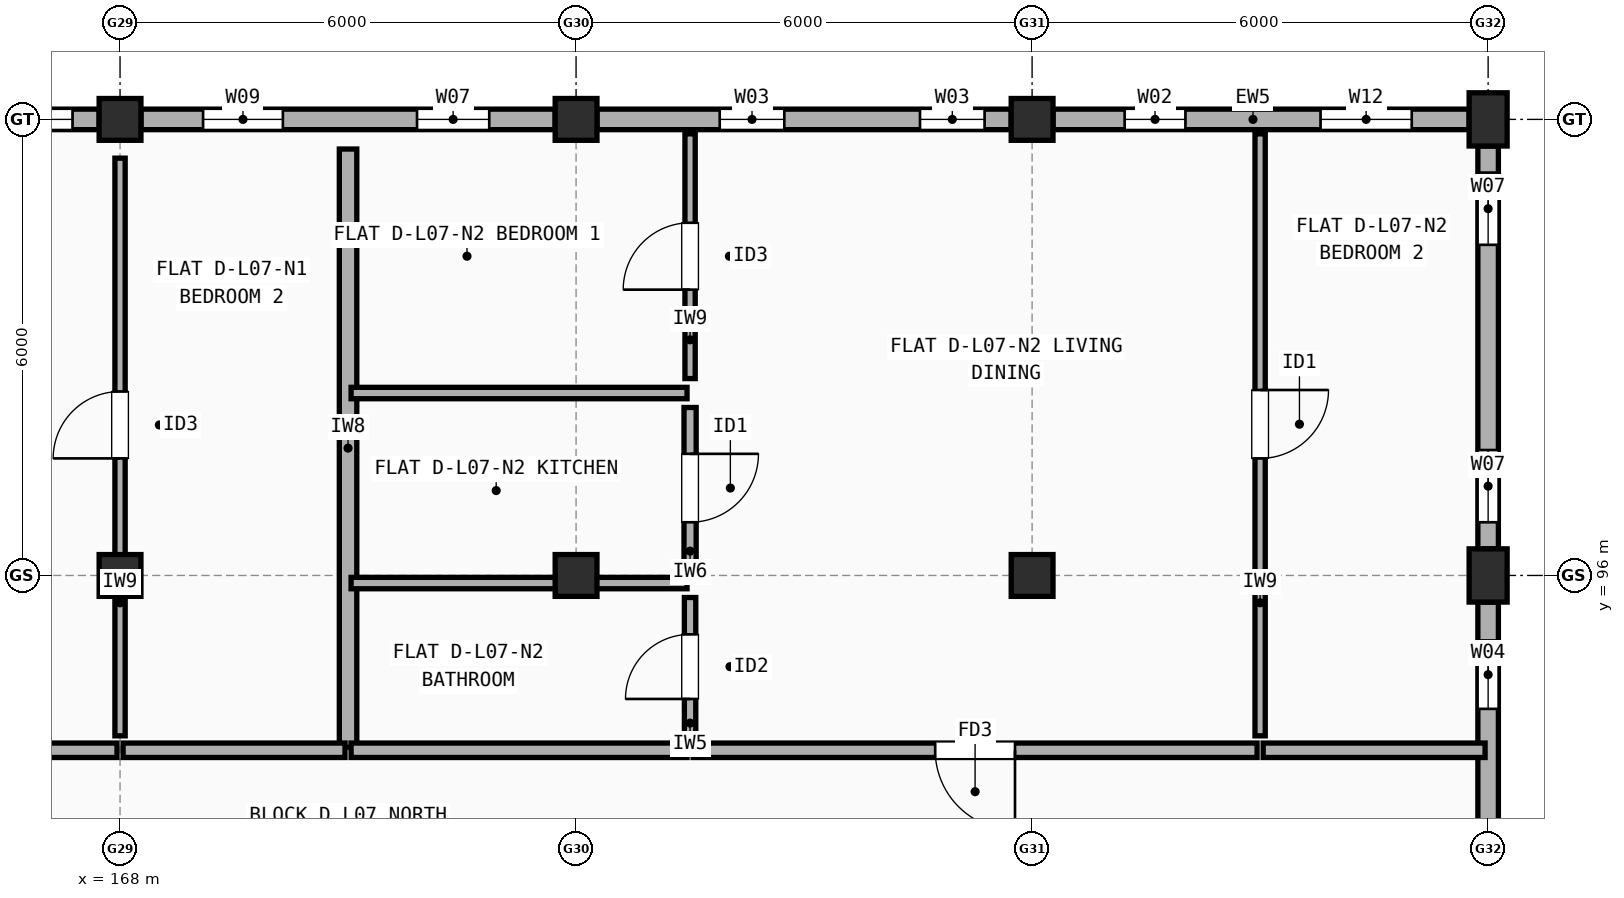
"""IFC4 building model, lengths in metres.
Left out: names, types, materials, properties, quantities, classifications, styles, units other than length and angle.
Written with IfcOpenShell. Run it as: python <this file> out.ifc"""

import sys

from ifc_helpers import new_model, si_unit, direction, frame, frame_2d, origin, origin_2d, place, context, subcontext, project, spatial, rectangle, extrude, element, fill, save


model = new_model("IFC4")
c1 = context("Model", 3, precision=1e-05, world=origin(), true_north=direction((0.0, 1.0)))
c2 = subcontext(c1, "Body", "Model", "MODEL_VIEW")
j1 = project(units=[si_unit("LENGTHUNIT", "METRE"), si_unit("PLANEANGLEUNIT", "RADIAN")], contexts=[c1])
p1 = place(None, origin())
s1 = spatial("IfcSite", under=j1, at=p1, CompositionType="ELEMENT")
p2 = place(p1, origin())
s2 = spatial("IfcBuilding", under=s1, at=p2, CompositionType="ELEMENT")
p3 = place(p2, frame((0.0, 0.0, 23.7)))
s3 = spatial("IfcBuildingStorey", under=s2, at=p3, CompositionType="ELEMENT", Elevation=23.7)
for number, where, z_axis, x_axis in (
    (1, (168.0, 96.0, 0.0), (0.0, 0.0, 1.0), (1.0, 0.0, 0.0)),
    (2, (168.0, 102.0, 0.0), (0.0, 0.0, 1.0), (1.0, 0.0, 0.0)),
    (3, (174.0, 96.0, 0.0), (0.0, 0.0, 1.0), (1.0, 0.0, 0.0)),
    (4, (174.0, 102.0, 0.0), (0.0, 0.0, 1.0), (1.0, 0.0, 0.0)),
    (5, (180.0, 96.0, 0.0), (0.0, 0.0, 1.0), (1.0, 0.0, 0.0)),
    (6, (180.0, 102.0, 0.0), (0.0, 0.0, 1.0), (1.0, 0.0, 0.0)),
):
    element("IfcColumn", number, at=place(p3, frame(where, z_axis=z_axis, x_axis=x_axis)), inside=s3, PredefinedType="COLUMN", context=c2, shape_type="SweptSolid", body=[
        extrude(rectangle(XDim=0.55, YDim=0.55, at=origin_2d()), origin(), (0.0, 0.0, 1.0), 2.975),
    ])
for number, where, z_axis, x_axis in (
    (7, (186.0, 96.0, 0.0), (0.0, 0.0, 1.0), (1.0, 0.0, 0.0)),
    (8, (186.0, 102.0, 0.0), (0.0, 0.0, 1.0), (1.0, 0.0, 0.0)),
):
    element("IfcColumn", number, at=place(p3, frame(where, z_axis=z_axis, x_axis=x_axis)), inside=s3, PredefinedType="COLUMN", context=c2, shape_type="SweptSolid", body=[
        extrude(rectangle(XDim=0.5, YDim=0.7, at=origin_2d()), origin(), (0.0, 0.0, 1.0), 2.975),
    ])
p4 = place(p3, frame((186.0, 90.35, 0.0), z_axis=(0.0, 0.0, 1.0), x_axis=(0.0, 1.0, 0.0)))
e9 = element("IfcWall", 9, at=p4, inside=s3, PredefinedType="STANDARD", context=c2, shape_type="SweptSolid", body=[
    extrude(rectangle(XDim=5.3, YDim=0.27, at=frame_2d((2.65, 0.0))), origin(), (0.0, 0.0, 1.0), 2.457),
])
p5 = place(p4, frame((1.23, 0.0, 0.9)))
e10 = element("IfcOpeningElement", 10, at=p5, cuts=e9, PredefinedType="OPENING", context=c2, shape_type="SweptSolid", body=[
    extrude(rectangle(XDim=0.85, YDim=1.25, at=frame_2d((0.425, 0.625))), frame((0.0, 0.145, 0.0), z_axis=(0.0, -1.0, 0.0), x_axis=(1.0, 0.0, 0.0)), (0.0, 0.0, 1.0), 0.29),
])
p6 = place(p4, frame((3.895, 0.0, 0.9)))
e11 = element("IfcOpeningElement", 11, at=p6, cuts=e9, PredefinedType="OPENING", context=c2, shape_type="SweptSolid", body=[
    extrude(rectangle(XDim=0.9, YDim=1.3, at=frame_2d((0.45, 0.65))), frame((0.0, 0.145, 0.0), z_axis=(0.0, -1.0, 0.0), x_axis=(1.0, 0.0, 0.0)), (0.0, 0.0, 1.0), 0.29),
])
p7 = place(p3, frame((186.0, 96.35, 0.0), z_axis=(0.0, 0.0, 1.0), x_axis=(0.0, 1.0, 0.0)))
e12 = element("IfcWall", 12, at=p7, inside=s3, PredefinedType="STANDARD", context=c2, shape_type="SweptSolid", body=[
    extrude(rectangle(XDim=5.3, YDim=0.27, at=frame_2d((2.65, 0.0))), origin(), (0.0, 0.0, 1.0), 2.457),
])
p8 = place(p7, frame((0.35, 0.0, 0.9)))
e13 = element("IfcOpeningElement", 13, at=p8, cuts=e12, PredefinedType="OPENING", context=c2, shape_type="SweptSolid", body=[
    extrude(rectangle(XDim=0.95, YDim=1.35, at=frame_2d((0.475, 0.675))), frame((0.0, 0.145, 0.0), z_axis=(0.0, -1.0, 0.0), x_axis=(1.0, 0.0, 0.0)), (0.0, 0.0, 1.0), 0.29),
])
p9 = place(p7, frame((4.0, 0.0, 0.9)))
e14 = element("IfcOpeningElement", 14, at=p9, cuts=e12, PredefinedType="OPENING", context=c2, shape_type="SweptSolid", body=[
    extrude(rectangle(XDim=0.95, YDim=1.35, at=frame_2d((0.475, 0.675))), frame((0.0, 0.145, 0.0), z_axis=(0.0, -1.0, 0.0), x_axis=(1.0, 0.0, 0.0)), (0.0, 0.0, 1.0), 0.29),
])
p10 = place(p3, frame((185.75, 102.0, 0.0), z_axis=(0.0, 0.0, 1.0), x_axis=(-1.0, 0.0, 0.0)))
e15 = element("IfcWall", 15, at=p10, inside=s3, PredefinedType="STANDARD", context=c2, shape_type="SweptSolid", body=[
    extrude(rectangle(XDim=5.475, YDim=0.27, at=frame_2d((2.738, 0.0))), origin(), (0.0, 0.0, 1.0), 2.457),
])
p11 = place(p10, frame((0.755, 0.0, 0.9)))
e16 = element("IfcOpeningElement", 16, at=p11, cuts=e15, PredefinedType="OPENING", context=c2, shape_type="SweptSolid", body=[
    extrude(rectangle(XDim=1.2, YDim=1.35, at=frame_2d((0.6, 0.675))), frame((0.0, 0.145, 0.0), z_axis=(0.0, -1.0, 0.0), x_axis=(1.0, 0.0, 0.0)), (0.0, 0.0, 1.0), 0.29),
])
p12 = place(p10, frame((3.732, 0.0, 0.9)))
e17 = element("IfcOpeningElement", 17, at=p12, cuts=e15, PredefinedType="OPENING", context=c2, shape_type="SweptSolid", body=[
    extrude(rectangle(XDim=0.8, YDim=1.2, at=frame_2d((0.4, 0.6))), frame((0.0, 0.145, 0.0), z_axis=(0.0, -1.0, 0.0), x_axis=(1.0, 0.0, 0.0)), (0.0, 0.0, 1.0), 0.29),
])
p13 = place(p3, frame((179.725, 102.0, 0.0), z_axis=(0.0, 0.0, 1.0), x_axis=(-1.0, 0.0, 0.0)))
e18 = element("IfcWall", 18, at=p13, inside=s3, PredefinedType="STANDARD", context=c2, shape_type="SweptSolid", body=[
    extrude(rectangle(XDim=5.45, YDim=0.27, at=frame_2d((2.725, 0.0))), origin(), (0.0, 0.0, 1.0), 2.457),
])
p14 = place(p13, frame((0.35, 0.0, 0.9)))
e19 = element("IfcOpeningElement", 19, at=p14, cuts=e18, PredefinedType="OPENING", context=c2, shape_type="SweptSolid", body=[
    extrude(rectangle(XDim=0.85, YDim=1.25, at=frame_2d((0.425, 0.625))), frame((0.0, 0.145, 0.0), z_axis=(0.0, -1.0, 0.0), x_axis=(1.0, 0.0, 0.0)), (0.0, 0.0, 1.0), 0.29),
])
p15 = place(p13, frame((2.985, 0.0, 0.9)))
e20 = element("IfcOpeningElement", 20, at=p15, cuts=e18, PredefinedType="OPENING", context=c2, shape_type="SweptSolid", body=[
    extrude(rectangle(XDim=0.85, YDim=1.25, at=frame_2d((0.425, 0.625))), frame((0.0, 0.145, 0.0), z_axis=(0.0, -1.0, 0.0), x_axis=(1.0, 0.0, 0.0)), (0.0, 0.0, 1.0), 0.29),
])
p16 = place(p3, frame((173.725, 102.0, 0.0), z_axis=(0.0, 0.0, 1.0), x_axis=(-1.0, 0.0, 0.0)))
e21 = element("IfcWall", 21, at=p16, inside=s3, PredefinedType="STANDARD", context=c2, shape_type="SweptSolid", body=[
    extrude(rectangle(XDim=5.45, YDim=0.27, at=frame_2d((2.725, 0.0))), origin(), (0.0, 0.0, 1.0), 2.457),
])
p17 = place(p16, frame((0.867, 0.0, 0.9)))
e22 = element("IfcOpeningElement", 22, at=p17, cuts=e21, PredefinedType="OPENING", context=c2, shape_type="SweptSolid", body=[
    extrude(rectangle(XDim=0.95, YDim=1.35, at=frame_2d((0.475, 0.675))), frame((0.0, 0.145, 0.0), z_axis=(0.0, -1.0, 0.0), x_axis=(1.0, 0.0, 0.0)), (0.0, 0.0, 1.0), 0.29),
])
p18 = place(p16, frame((3.583, 0.0, 0.9)))
e23 = element("IfcOpeningElement", 23, at=p18, cuts=e21, PredefinedType="OPENING", context=c2, shape_type="SweptSolid", body=[
    extrude(rectangle(XDim=1.05, YDim=1.35, at=frame_2d((0.525, 0.675))), frame((0.0, 0.145, 0.0), z_axis=(0.0, -1.0, 0.0), x_axis=(1.0, 0.0, 0.0)), (0.0, 0.0, 1.0), 0.29),
])
p19 = place(p3, frame((167.725, 102.0, 0.0), z_axis=(0.0, 0.0, 1.0), x_axis=(-1.0, 0.0, 0.0)))
e24 = element("IfcWall", 24, at=p19, inside=s3, PredefinedType="STANDARD", context=c2, shape_type="SweptSolid", body=[
    extrude(rectangle(XDim=5.45, YDim=0.27, at=frame_2d((2.725, 0.0))), origin(), (0.0, 0.0, 1.0), 2.457),
])
p20 = place(p19, frame((0.35, 0.0, 0.9)))
e25 = element("IfcOpeningElement", 25, at=p20, cuts=e24, PredefinedType="OPENING", context=c2, shape_type="SweptSolid", body=[
    extrude(rectangle(XDim=1.2, YDim=1.35, at=frame_2d((0.6, 0.675))), frame((0.0, 0.145, 0.0), z_axis=(0.0, -1.0, 0.0), x_axis=(1.0, 0.0, 0.0)), (0.0, 0.0, 1.0), 0.29),
])
p21 = place(p19, frame((3.9, 0.0, 0.9)))
e26 = element("IfcOpeningElement", 26, at=p21, cuts=e24, PredefinedType="OPENING", context=c2, shape_type="SweptSolid", body=[
    extrude(rectangle(XDim=1.2, YDim=1.35, at=frame_2d((0.6, 0.675))), frame((0.0, 0.145, 0.0), z_axis=(0.0, -1.0, 0.0), x_axis=(1.0, 0.0, 0.0)), (0.0, 0.0, 1.0), 0.29),
])
p22 = place(p3, frame((171.0, 93.74, 0.0), z_axis=(0.0, 0.0, 1.0), x_axis=(0.0, 1.0, 0.0)))
e27 = element("IfcWall", 27, at=p22, inside=s3, PredefinedType="SOLIDWALL", context=c2, shape_type="SweptSolid", body=[
    extrude(rectangle(XDim=7.87, YDim=0.23, at=frame_2d((3.935, 0.0))), origin(), (0.0, 0.0, 1.0), 2.548),
])
p23 = place(p3, frame((160.54, 93.7, 0.0), z_axis=(0.0, 0.0, 1.0), x_axis=(1.0, 0.0, 0.0)))
e28 = element("IfcWall", 28, at=p23, inside=s3, PredefinedType="SOLIDWALL", context=c2, shape_type="SweptSolid", body=[
    extrude(rectangle(XDim=7.42, YDim=0.19, at=frame_2d((3.71, 0.0))), origin(), (0.0, 0.0, 1.0), 2.508),
])
p24 = place(p23, frame((3.21, 0.0, 0.0)))
e29 = element("IfcOpeningElement", 29, at=p24, cuts=e28, PredefinedType="OPENING", context=c2, shape_type="SweptSolid", body=[
    extrude(rectangle(XDim=1.0, YDim=2.15, at=frame_2d((0.5, 1.075))), frame((0.0, 0.105, 0.0), z_axis=(0.0, -1.0, 0.0), x_axis=(1.0, 0.0, 0.0)), (0.0, 0.0, 1.0), 0.21),
])
p25 = place(p3, frame((168.04, 93.7, 0.0), z_axis=(0.0, 0.0, 1.0), x_axis=(1.0, 0.0, 0.0)))
e30 = element("IfcWall", 30, at=p25, inside=s3, PredefinedType="SOLIDWALL", context=c2, shape_type="SweptSolid", body=[
    extrude(rectangle(XDim=2.92, YDim=0.19, at=frame_2d((1.46, 0.0))), origin(), (0.0, 0.0, 1.0), 2.508),
])
p26 = place(p3, frame((168.0, 93.89, 0.0), z_axis=(0.0, 0.0, 1.0), x_axis=(0.0, 1.0, 0.0)))
e31 = element("IfcWall", 31, at=p26, inside=s3, PredefinedType="PARTITIONING", context=c2, shape_type="SweptSolid", body=[
    extrude(rectangle(XDim=7.6, YDim=0.135, at=frame_2d((3.8, 0.0))), origin(), (0.0, 0.0, 1.0), 2.508),
])
p27 = place(p26, frame((3.65, 0.0, 0.0)))
e32 = element("IfcOpeningElement", 32, at=p27, cuts=e31, PredefinedType="OPENING", context=c2, shape_type="SweptSolid", body=[
    extrude(rectangle(XDim=0.88, YDim=2.1, at=frame_2d((0.44, 1.05))), frame((0.0, 0.077, 0.0), z_axis=(0.0, -1.0, 0.0), x_axis=(1.0, 0.0, 0.0)), (0.0, 0.0, 1.0), 0.155),
])
p28 = place(p3, frame((171.04, 93.7, 0.0), z_axis=(0.0, 0.0, 1.0), x_axis=(1.0, 0.0, 0.0)))
e33 = element("IfcWall", 33, at=p28, inside=s3, PredefinedType="SOLIDWALL", context=c2, shape_type="SweptSolid", body=[
    extrude(rectangle(XDim=4.42, YDim=0.19, at=frame_2d((2.21, 0.0))), origin(), (0.0, 0.0, 1.0), 2.975),
])
p29 = place(p3, frame((175.54, 93.7, 0.0), z_axis=(0.0, 0.0, 1.0), x_axis=(1.0, 0.0, 0.0)))
e34 = element("IfcWall", 34, at=p29, inside=s3, PredefinedType="SOLIDWALL", context=c2, shape_type="SweptSolid", body=[
    extrude(rectangle(XDim=7.42, YDim=0.19, at=frame_2d((3.71, 0.0))), origin(), (0.0, 0.0, 1.0), 2.975),
])
p30 = place(p29, frame((3.185, 0.0, 0.0)))
e35 = element("IfcOpeningElement", 35, at=p30, cuts=e34, PredefinedType="OPENING", context=c2, shape_type="SweptSolid", body=[
    extrude(rectangle(XDim=1.05, YDim=2.15, at=frame_2d((0.525, 1.075))), frame((0.0, 0.105, 0.0), z_axis=(0.0, -1.0, 0.0), x_axis=(1.0, 0.0, 0.0)), (0.0, 0.0, 1.0), 0.21),
])
p31 = place(p3, frame((175.5, 98.59, 0.0), z_axis=(0.0, 0.0, 1.0), x_axis=(0.0, 1.0, 0.0)))
e36 = element("IfcWall", 36, at=p31, inside=s3, PredefinedType="PARTITIONING", context=c2, shape_type="SweptSolid", body=[
    extrude(rectangle(XDim=3.22, YDim=0.135, at=frame_2d((1.61, 0.0))), origin(), (0.0, 0.0, 1.0), 2.975),
])
p32 = place(p31, frame((1.17, 0.0, 0.0)))
e37 = element("IfcOpeningElement", 37, at=p32, cuts=e36, PredefinedType="OPENING", context=c2, shape_type="SweptSolid", body=[
    extrude(rectangle(XDim=0.88, YDim=2.1, at=frame_2d((0.44, 1.05))), frame((0.0, 0.077, 0.0), z_axis=(0.0, -1.0, 0.0), x_axis=(1.0, 0.0, 0.0)), (0.0, 0.0, 1.0), 0.155),
])
p33 = place(p3, frame((175.5, 96.09, 0.0), z_axis=(0.0, 0.0, 1.0), x_axis=(0.0, 1.0, 0.0)))
e38 = element("IfcWall", 38, at=p33, inside=s3, PredefinedType="PLUMBINGWALL", context=c2, shape_type="SweptSolid", body=[
    extrude(rectangle(XDim=2.12, YDim=0.16, at=frame_2d((1.06, 0.0))), origin(), (0.0, 0.0, 1.0), 2.975),
])
p34 = place(p33, frame((0.61, 0.0, 0.0)))
e39 = element("IfcOpeningElement", 39, at=p34, cuts=e38, PredefinedType="OPENING", context=c2, shape_type="SweptSolid", body=[
    extrude(rectangle(XDim=0.9, YDim=2.1, at=frame_2d((0.45, 1.05))), frame((0.0, 0.09, 0.0), z_axis=(0.0, -1.0, 0.0), x_axis=(1.0, 0.0, 0.0)), (0.0, 0.0, 1.0), 0.18),
])
p35 = place(p3, frame((175.5, 93.89, 0.0), z_axis=(0.0, 0.0, 1.0), x_axis=(0.0, 1.0, 0.0)))
e40 = element("IfcWall", 40, at=p35, inside=s3, PredefinedType="PARTITIONING", context=c2, shape_type="SweptSolid", body=[
    extrude(rectangle(XDim=1.82, YDim=0.15, at=frame_2d((0.91, 0.0))), origin(), (0.0, 0.0, 1.0), 2.975),
])
p36 = place(p35, frame((0.485, 0.0, 0.0)))
e41 = element("IfcOpeningElement", 41, at=p36, cuts=e40, PredefinedType="OPENING", context=c2, shape_type="SweptSolid", body=[
    extrude(rectangle(XDim=0.85, YDim=2.1, at=frame_2d((0.425, 1.05))), frame((0.0, 0.085, 0.0), z_axis=(0.0, -1.0, 0.0), x_axis=(1.0, 0.0, 0.0)), (0.0, 0.0, 1.0), 0.17),
])
p37 = place(p3, frame((171.04, 98.4, 0.0), z_axis=(0.0, 0.0, 1.0), x_axis=(1.0, 0.0, 0.0)))
e42 = element("IfcWall", 42, at=p37, inside=s3, PredefinedType="PARTITIONING", context=c2, shape_type="SweptSolid", body=[
    extrude(rectangle(XDim=4.42, YDim=0.15, at=frame_2d((2.21, 0.0))), origin(), (0.0, 0.0, 1.0), 2.548),
])
p38 = place(p3, frame((171.04, 95.9, 0.0), z_axis=(0.0, 0.0, 1.0), x_axis=(1.0, 0.0, 0.0)))
e43 = element("IfcWall", 43, at=p38, inside=s3, PredefinedType="PARTITIONING", context=c2, shape_type="SweptSolid", body=[
    extrude(rectangle(XDim=4.42, YDim=0.15, at=frame_2d((2.21, 0.0))), origin(), (0.0, 0.0, 1.0), 2.508),
])
p39 = place(p3, frame((183.04, 93.7, 0.0), z_axis=(0.0, 0.0, 1.0), x_axis=(1.0, 0.0, 0.0)))
e44 = element("IfcWall", 44, at=p39, inside=s3, PredefinedType="SOLIDWALL", context=c2, shape_type="SweptSolid", body=[
    extrude(rectangle(XDim=2.92, YDim=0.19, at=frame_2d((1.46, 0.0))), origin(), (0.0, 0.0, 1.0), 2.457),
])
p40 = place(p3, frame((183.0, 93.89, 0.0), z_axis=(0.0, 0.0, 1.0), x_axis=(0.0, 1.0, 0.0)))
e45 = element("IfcWall", 45, at=p40, inside=s3, PredefinedType="PARTITIONING", context=c2, shape_type="SweptSolid", body=[
    extrude(rectangle(XDim=7.92, YDim=0.135, at=frame_2d((3.96, 0.0))), origin(), (0.0, 0.0, 1.0), 2.408),
])
p41 = place(p40, frame((3.65, 0.0, 0.0)))
e46 = element("IfcOpeningElement", 46, at=p41, cuts=e45, PredefinedType="OPENING", context=c2, shape_type="SweptSolid", body=[
    extrude(rectangle(XDim=0.9, YDim=2.1, at=frame_2d((0.45, 1.05))), frame((0.0, 0.077, 0.0), z_axis=(0.0, -1.0, 0.0), x_axis=(1.0, 0.0, 0.0)), (0.0, 0.0, 1.0), 0.155),
])
p42 = place(p6, origin())
e47 = element("IfcWindow", 47, at=p42, inside=s3, PartitioningType="SINGLE_PANEL", PredefinedType="WINDOW", context=c2, shape_type="SweptSolid", body=[
    extrude(rectangle(XDim=0.9, YDim=1.3, at=frame_2d((0.45, 0.65))), frame((0.0, 0.03, 0.0), z_axis=(0.0, -1.0, 0.0), x_axis=(1.0, 0.0, 0.0)), (0.0, 0.0, 1.0), 0.06),
])
fill(e11, e47)
p43 = place(p8, origin())
e48 = element("IfcWindow", 48, at=p43, inside=s3, PartitioningType="SINGLE_PANEL", PredefinedType="WINDOW", context=c2, shape_type="SweptSolid", body=[
    extrude(rectangle(XDim=0.95, YDim=1.35, at=frame_2d((0.475, 0.675))), frame((0.0, 0.03, 0.0), z_axis=(0.0, -1.0, 0.0), x_axis=(1.0, 0.0, 0.0)), (0.0, 0.0, 1.0), 0.06),
])
fill(e13, e48)
p44 = place(p9, origin())
e49 = element("IfcWindow", 49, at=p44, inside=s3, PartitioningType="SINGLE_PANEL", PredefinedType="WINDOW", context=c2, shape_type="SweptSolid", body=[
    extrude(rectangle(XDim=0.95, YDim=1.35, at=frame_2d((0.475, 0.675))), frame((0.0, 0.03, 0.0), z_axis=(0.0, -1.0, 0.0), x_axis=(1.0, 0.0, 0.0)), (0.0, 0.0, 1.0), 0.06),
])
fill(e14, e49)
p45 = place(p11, origin())
e50 = element("IfcWindow", 50, at=p45, inside=s3, PartitioningType="SINGLE_PANEL", PredefinedType="WINDOW", context=c2, shape_type="SweptSolid", body=[
    extrude(rectangle(XDim=1.2, YDim=1.35, at=frame_2d((0.6, 0.675))), frame((0.0, 0.03, 0.0), z_axis=(0.0, -1.0, 0.0), x_axis=(1.0, 0.0, 0.0)), (0.0, 0.0, 1.0), 0.06),
])
fill(e16, e50)
p46 = place(p12, origin())
e51 = element("IfcWindow", 51, at=p46, inside=s3, PartitioningType="SINGLE_PANEL", PredefinedType="WINDOW", context=c2, shape_type="SweptSolid", body=[
    extrude(rectangle(XDim=0.8, YDim=1.2, at=frame_2d((0.4, 0.6))), frame((0.0, 0.03, 0.0), z_axis=(0.0, -1.0, 0.0), x_axis=(1.0, 0.0, 0.0)), (0.0, 0.0, 1.0), 0.06),
])
fill(e17, e51)
p47 = place(p14, origin())
e52 = element("IfcWindow", 52, at=p47, inside=s3, PartitioningType="SINGLE_PANEL", PredefinedType="WINDOW", context=c2, shape_type="SweptSolid", body=[
    extrude(rectangle(XDim=0.85, YDim=1.25, at=frame_2d((0.425, 0.625))), frame((0.0, 0.03, 0.0), z_axis=(0.0, -1.0, 0.0), x_axis=(1.0, 0.0, 0.0)), (0.0, 0.0, 1.0), 0.06),
])
fill(e19, e52)
p48 = place(p15, origin())
e53 = element("IfcWindow", 53, at=p48, inside=s3, PartitioningType="SINGLE_PANEL", PredefinedType="WINDOW", context=c2, shape_type="SweptSolid", body=[
    extrude(rectangle(XDim=0.85, YDim=1.25, at=frame_2d((0.425, 0.625))), frame((0.0, 0.03, 0.0), z_axis=(0.0, -1.0, 0.0), x_axis=(1.0, 0.0, 0.0)), (0.0, 0.0, 1.0), 0.06),
])
fill(e20, e53)
p49 = place(p17, origin())
e54 = element("IfcWindow", 54, at=p49, inside=s3, PartitioningType="SINGLE_PANEL", PredefinedType="WINDOW", context=c2, shape_type="SweptSolid", body=[
    extrude(rectangle(XDim=0.95, YDim=1.35, at=frame_2d((0.475, 0.675))), frame((0.0, 0.03, 0.0), z_axis=(0.0, -1.0, 0.0), x_axis=(1.0, 0.0, 0.0)), (0.0, 0.0, 1.0), 0.06),
])
fill(e22, e54)
p50 = place(p18, origin())
e55 = element("IfcWindow", 55, at=p50, inside=s3, PartitioningType="SINGLE_PANEL", PredefinedType="WINDOW", context=c2, shape_type="SweptSolid", body=[
    extrude(rectangle(XDim=1.05, YDim=1.35, at=frame_2d((0.525, 0.675))), frame((0.0, 0.03, 0.0), z_axis=(0.0, -1.0, 0.0), x_axis=(1.0, 0.0, 0.0)), (0.0, 0.0, 1.0), 0.06),
])
fill(e23, e55)
p51 = place(p20, origin())
e56 = element("IfcWindow", 56, at=p51, inside=s3, PartitioningType="SINGLE_PANEL", PredefinedType="WINDOW", context=c2, shape_type="SweptSolid", body=[
    extrude(rectangle(XDim=1.2, YDim=1.35, at=frame_2d((0.6, 0.675))), frame((0.0, 0.03, 0.0), z_axis=(0.0, -1.0, 0.0), x_axis=(1.0, 0.0, 0.0)), (0.0, 0.0, 1.0), 0.06),
])
fill(e25, e56)
p52 = place(p27, origin())
e57 = element("IfcDoor", 57, at=p52, inside=s3, OperationType="SINGLE_SWING_LEFT", PredefinedType="DOOR", context=c2, shape_type="SweptSolid", body=[
    extrude(rectangle(XDim=0.88, YDim=2.1, at=frame_2d((0.44, 1.05))), frame((0.0, 0.025, 0.0), z_axis=(0.0, -1.0, 0.0), x_axis=(1.0, 0.0, 0.0)), (0.0, 0.0, 1.0), 0.05),
])
fill(e32, e57)
p53 = place(p30, origin())
e58 = element("IfcDoor", 58, at=p53, inside=s3, OperationType="SINGLE_SWING_RIGHT", PredefinedType="DOOR", context=c2, shape_type="SweptSolid", body=[
    extrude(rectangle(XDim=1.05, YDim=2.15, at=frame_2d((0.525, 1.075))), frame((0.0, 0.025, 0.0), z_axis=(0.0, -1.0, 0.0), x_axis=(1.0, 0.0, 0.0)), (0.0, 0.0, 1.0), 0.05),
])
fill(e35, e58)
p54 = place(p32, origin())
e59 = element("IfcDoor", 59, at=p54, inside=s3, OperationType="SINGLE_SWING_LEFT", PredefinedType="DOOR", context=c2, shape_type="SweptSolid", body=[
    extrude(rectangle(XDim=0.88, YDim=2.1, at=frame_2d((0.44, 1.05))), frame((0.0, 0.025, 0.0), z_axis=(0.0, -1.0, 0.0), x_axis=(1.0, 0.0, 0.0)), (0.0, 0.0, 1.0), 0.05),
])
fill(e37, e59)
p55 = place(p34, origin())
e60 = element("IfcDoor", 60, at=p55, inside=s3, OperationType="SINGLE_SWING_RIGHT", PredefinedType="DOOR", context=c2, shape_type="SweptSolid", body=[
    extrude(rectangle(XDim=0.9, YDim=2.1, at=frame_2d((0.45, 1.05))), frame((0.0, 0.025, 0.0), z_axis=(0.0, -1.0, 0.0), x_axis=(1.0, 0.0, 0.0)), (0.0, 0.0, 1.0), 0.05),
])
fill(e39, e60)
p56 = place(p36, origin())
e61 = element("IfcDoor", 61, at=p56, inside=s3, OperationType="SINGLE_SWING_LEFT", PredefinedType="DOOR", context=c2, shape_type="SweptSolid", body=[
    extrude(rectangle(XDim=0.85, YDim=2.1, at=frame_2d((0.425, 1.05))), frame((0.0, 0.025, 0.0), z_axis=(0.0, -1.0, 0.0), x_axis=(1.0, 0.0, 0.0)), (0.0, 0.0, 1.0), 0.05),
])
fill(e41, e61)
p57 = place(p41, origin())
e62 = element("IfcDoor", 62, at=p57, inside=s3, OperationType="SINGLE_SWING_RIGHT", PredefinedType="DOOR", context=c2, shape_type="SweptSolid", body=[
    extrude(rectangle(XDim=0.9, YDim=2.1, at=frame_2d((0.45, 1.05))), frame((0.0, 0.025, 0.0), z_axis=(0.0, -1.0, 0.0), x_axis=(1.0, 0.0, 0.0)), (0.0, 0.0, 1.0), 0.05),
])
fill(e46, e62)
save(model, sys.argv[1])
